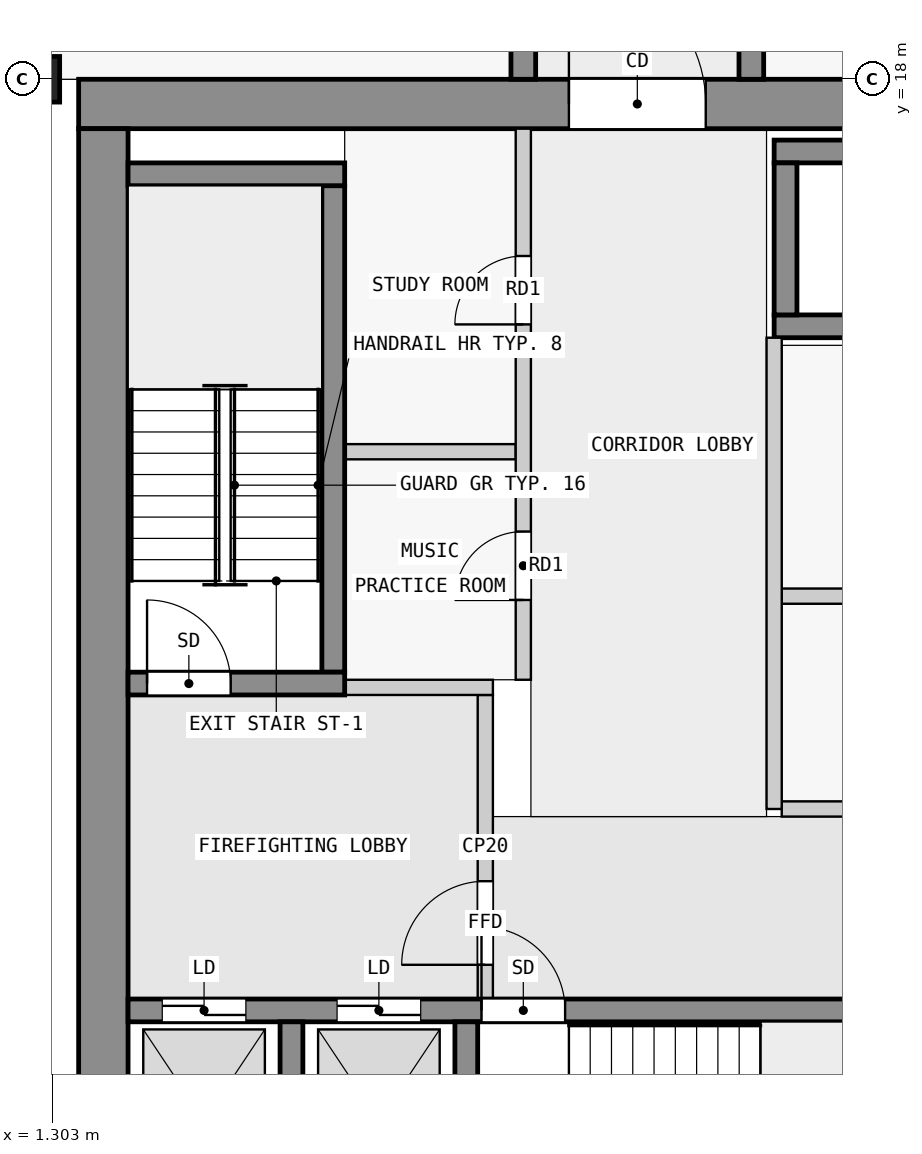
"""IFC4 building model, lengths in metres.
Left out: names, types, materials, properties, quantities, classifications, styles, units other than length and angle.
Written with IfcOpenShell. Run it as: python <this file> out.ifc"""

import sys

from ifc_helpers import new_model, si_unit, direction, frame, frame_2d, origin, origin_2d, place, context, subcontext, project, spatial, rectangle, extrude, element, fill, save


model = new_model("IFC4")
c1 = context("Model", 3, precision=1e-05, world=origin(), true_north=direction((0.0, 1.0)))
c2 = subcontext(c1, "Body", "Model", "MODEL_VIEW")
j1 = project(units=[si_unit("LENGTHUNIT", "METRE"), si_unit("PLANEANGLEUNIT", "RADIAN")], contexts=[c1])
p1 = place(None, origin())
s1 = spatial("IfcSite", under=j1, at=p1, CompositionType="ELEMENT")
p2 = place(p1, origin())
s2 = spatial("IfcBuilding", under=s1, at=p2, CompositionType="ELEMENT")
p3 = place(p2, frame((0.0, 0.0, 99.3)))
s3 = spatial("IfcBuildingStorey", under=s2, at=p3, CompositionType="ELEMENT", Elevation=99.3)
p4 = place(p3, frame((0.7, 18.0, 0.0), z_axis=(0.0, 0.0, 1.0), x_axis=(0.0, 1.0, 0.0)))
e1 = element("IfcColumn", 1, at=p4, inside=s3, PredefinedType="COLUMN", context=c2, shape_type="SweptSolid", body=[
    extrude(rectangle(XDim=0.6, YDim=1.4, at=origin_2d()), origin(), (0.0, 0.0, 1.0), 3.5),
])
p5 = place(p3, frame((1.65, 17.675, 0.0), z_axis=(0.0, 0.0, 1.0), x_axis=(1.0, 0.0, 0.0)))
e2 = element("IfcWall", 2, at=p5, inside=s3, PredefinedType="SHEAR", context=c2, shape_type="SweptSolid", body=[
    extrude(rectangle(XDim=20.85, YDim=0.65, at=frame_2d((10.425, 0.0))), origin(), (0.0, 0.0, 1.0), 3.25),
])
p6 = place(p5, frame((6.45, 0.0, 0.0)))
e3 = element("IfcOpeningElement", 3, at=p6, cuts=e2, PredefinedType="OPENING", context=c2, shape_type="SweptSolid", body=[
    extrude(rectangle(XDim=1.8, YDim=2.1, at=frame_2d((0.9, 1.05))), frame((0.0, 0.335, 0.0), z_axis=(0.0, -1.0, 0.0), x_axis=(1.0, 0.0, 0.0)), (0.0, 0.0, 1.0), 0.67),
])
p7 = place(p3, frame((1.975, 2.5, 0.0), z_axis=(0.0, 0.0, 1.0), x_axis=(0.0, 1.0, 0.0)))
e4 = element("IfcWall", 4, at=p7, inside=s3, PredefinedType="SHEAR", context=c2, shape_type="SweptSolid", body=[
    extrude(rectangle(XDim=14.85, YDim=0.65, at=frame_2d((7.425, 0.0))), origin(), (0.0, 0.0, 1.0), 3.25),
])
for number, where, z_axis, x_axis in (
    (5, (4.45, 2.8, 0.0), (0.0, 0.0, 1.0), (0.0, 1.0, 0.0)),
    (6, (6.75, 2.8, 0.0), (0.0, 0.0, 1.0), (0.0, 1.0, 0.0)),
):
    element("IfcWall", number, at=place(p3, frame(where, z_axis=z_axis, x_axis=x_axis)), inside=s3, PredefinedType="SHEAR", context=c2, shape_type="SweptSolid", body=[
        extrude(rectangle(XDim=2.8, YDim=0.3, at=frame_2d((1.4, 0.0))), origin(), (0.0, 0.0, 1.0), 3.25),
    ])
p8 = place(p3, frame((2.3, 5.75, 0.0), z_axis=(0.0, 0.0, 1.0), x_axis=(1.0, 0.0, 0.0)))
e7 = element("IfcWall", 7, at=p8, inside=s3, PredefinedType="SHEAR", context=c2, shape_type="SweptSolid", body=[
    extrude(rectangle(XDim=18.8, YDim=0.3, at=frame_2d((9.4, 0.0))), origin(), (0.0, 0.0, 1.0), 3.25),
])
p9 = place(p8, frame((4.65, 0.0, 0.0)))
e8 = element("IfcOpeningElement", 8, at=p9, cuts=e7, PredefinedType="OPENING", context=c2, shape_type="SweptSolid", body=[
    extrude(rectangle(XDim=1.1, YDim=2.1, at=frame_2d((0.55, 1.05))), frame((0.0, 0.16, 0.0), z_axis=(0.0, -1.0, 0.0), x_axis=(1.0, 0.0, 0.0)), (0.0, 0.0, 1.0), 0.32),
])
p10 = place(p8, frame((0.45, 0.0, 0.0)))
e9 = element("IfcOpeningElement", 9, at=p10, cuts=e7, PredefinedType="OPENING", context=c2, shape_type="SweptSolid", body=[
    extrude(rectangle(XDim=1.1, YDim=2.1, at=frame_2d((0.55, 1.05))), frame((0.0, 0.16, 0.0), z_axis=(0.0, -1.0, 0.0), x_axis=(1.0, 0.0, 0.0)), (0.0, 0.0, 1.0), 0.32),
])
p11 = place(p8, frame((2.75, 0.0, 0.0)))
e10 = element("IfcOpeningElement", 10, at=p11, cuts=e7, PredefinedType="OPENING", context=c2, shape_type="SweptSolid", body=[
    extrude(rectangle(XDim=1.1, YDim=2.1, at=frame_2d((0.55, 1.05))), frame((0.0, 0.16, 0.0), z_axis=(0.0, -1.0, 0.0), x_axis=(1.0, 0.0, 0.0)), (0.0, 0.0, 1.0), 0.32),
])
p12 = place(p8, frame((11.85, 0.0, 0.0)))
e11 = element("IfcOpeningElement", 11, at=p12, cuts=e7, PredefinedType="OPENING", context=c2, shape_type="SweptSolid", body=[
    extrude(rectangle(XDim=1.1, YDim=2.1, at=frame_2d((0.55, 1.05))), frame((0.0, 0.16, 0.0), z_axis=(0.0, -1.0, 0.0), x_axis=(1.0, 0.0, 0.0)), (0.0, 0.0, 1.0), 0.32),
])
p13 = place(p8, frame((14.35, 0.0, 0.0)))
e12 = element("IfcOpeningElement", 12, at=p13, cuts=e7, PredefinedType="OPENING", context=c2, shape_type="SweptSolid", body=[
    extrude(rectangle(XDim=1.1, YDim=2.1, at=frame_2d((0.55, 1.05))), frame((0.0, 0.16, 0.0), z_axis=(0.0, -1.0, 0.0), x_axis=(1.0, 0.0, 0.0)), (0.0, 0.0, 1.0), 0.32),
])
p14 = place(p8, frame((16.85, 0.0, 0.0)))
e13 = element("IfcOpeningElement", 13, at=p14, cuts=e7, PredefinedType="OPENING", context=c2, shape_type="SweptSolid", body=[
    extrude(rectangle(XDim=1.1, YDim=2.1, at=frame_2d((0.55, 1.05))), frame((0.0, 0.16, 0.0), z_axis=(0.0, -1.0, 0.0), x_axis=(1.0, 0.0, 0.0)), (0.0, 0.0, 1.0), 0.32),
])
p15 = place(p3, frame((2.3, 10.05, 0.0), z_axis=(0.0, 0.0, 1.0), x_axis=(1.0, 0.0, 0.0)))
e14 = element("IfcWall", 14, at=p15, inside=s3, PredefinedType="SHEAR", context=c2, shape_type="SweptSolid", body=[
    extrude(rectangle(XDim=2.85, YDim=0.3, at=frame_2d((1.425, 0.0))), origin(), (0.0, 0.0, 1.0), 3.25),
])
p16 = place(p15, frame((0.25, 0.0, 0.0)))
e15 = element("IfcOpeningElement", 15, at=p16, cuts=e14, PredefinedType="OPENING", context=c2, shape_type="SweptSolid", body=[
    extrude(rectangle(XDim=1.1, YDim=2.1, at=frame_2d((0.55, 1.05))), frame((0.0, 0.16, 0.0), z_axis=(0.0, -1.0, 0.0), x_axis=(1.0, 0.0, 0.0)), (0.0, 0.0, 1.0), 0.32),
])
p17 = place(p3, frame((5.0, 10.2, 0.0), z_axis=(0.0, 0.0, 1.0), x_axis=(0.0, 1.0, 0.0)))
e16 = element("IfcWall", 16, at=p17, inside=s3, PredefinedType="SHEAR", context=c2, shape_type="SweptSolid", body=[
    extrude(rectangle(XDim=6.4, YDim=0.3, at=frame_2d((3.2, 0.0))), origin(), (0.0, 0.0, 1.0), 3.25),
])
p18 = place(p3, frame((2.3, 16.75, 0.0), z_axis=(0.0, 0.0, 1.0), x_axis=(1.0, 0.0, 0.0)))
e17 = element("IfcWall", 17, at=p18, inside=s3, PredefinedType="SHEAR", context=c2, shape_type="SweptSolid", body=[
    extrude(rectangle(XDim=2.85, YDim=0.3, at=frame_2d((1.425, 0.0))), origin(), (0.0, 0.0, 1.0), 3.25),
])
for number, where, z_axis, x_axis in (
    (18, (10.8, 17.05, 0.0), (0.0, 0.0, 1.0), (1.0, 0.0, 0.0)),
    (19, (10.8, 14.75, 0.0), (0.0, 0.0, 1.0), (1.0, 0.0, 0.0)),
):
    element("IfcWall", number, at=place(p3, frame(where, z_axis=z_axis, x_axis=x_axis)), inside=s3, PredefinedType="SHEAR", context=c2, shape_type="SweptSolid", body=[
        extrude(rectangle(XDim=7.8, YDim=0.3, at=frame_2d((3.9, 0.0))), origin(), (0.0, 0.0, 1.0), 3.25),
    ])
p19 = place(p3, frame((10.95, 14.9, 0.0), z_axis=(0.0, 0.0, 1.0), x_axis=(0.0, 1.0, 0.0)))
e20 = element("IfcWall", 20, at=p19, inside=s3, PredefinedType="SHEAR", context=c2, shape_type="SweptSolid", body=[
    extrude(rectangle(XDim=2.0, YDim=0.3, at=frame_2d((1.0, 0.0))), origin(), (0.0, 0.0, 1.0), 3.25),
])
p20 = place(p3, frame((7.5, 18.0, 0.0), z_axis=(0.0, 0.0, 1.0), x_axis=(0.0, 1.0, 0.0)))
e21 = element("IfcWall", 21, at=p20, inside=s3, PredefinedType="SHEAR", context=c2, shape_type="SweptSolid", body=[
    extrude(rectangle(XDim=27.0, YDim=0.325, at=frame_2d((13.5, 0.0))), origin(), (0.0, 0.0, 1.0), 3.25),
])
p21 = place(p20, frame((1.75, 0.0, 0.0)))
e22 = element("IfcOpeningElement", 22, at=p21, cuts=e21, PredefinedType="OPENING", context=c2, shape_type="SweptSolid", body=[
    extrude(rectangle(XDim=1.0, YDim=2.1, at=frame_2d((0.5, 1.05))), frame((0.0, 0.172, 0.0), z_axis=(0.0, -1.0, 0.0), x_axis=(1.0, 0.0, 0.0)), (0.0, 0.0, 1.0), 0.345),
])
p22 = place(p20, frame((6.25, 0.0, 0.0)))
e23 = element("IfcOpeningElement", 23, at=p22, cuts=e21, PredefinedType="OPENING", context=c2, shape_type="SweptSolid", body=[
    extrude(rectangle(XDim=1.0, YDim=2.1, at=frame_2d((0.5, 1.05))), frame((0.0, 0.172, 0.0), z_axis=(0.0, -1.0, 0.0), x_axis=(1.0, 0.0, 0.0)), (0.0, 0.0, 1.0), 0.345),
])
p23 = place(p20, frame((10.75, 0.0, 0.0)))
e24 = element("IfcOpeningElement", 24, at=p23, cuts=e21, PredefinedType="OPENING", context=c2, shape_type="SweptSolid", body=[
    extrude(rectangle(XDim=1.0, YDim=2.1, at=frame_2d((0.5, 1.05))), frame((0.0, 0.172, 0.0), z_axis=(0.0, -1.0, 0.0), x_axis=(1.0, 0.0, 0.0)), (0.0, 0.0, 1.0), 0.345),
])
p24 = place(p20, frame((15.25, 0.0, 0.0)))
e25 = element("IfcOpeningElement", 25, at=p24, cuts=e21, PredefinedType="OPENING", context=c2, shape_type="SweptSolid", body=[
    extrude(rectangle(XDim=1.0, YDim=2.1, at=frame_2d((0.5, 1.05))), frame((0.0, 0.172, 0.0), z_axis=(0.0, -1.0, 0.0), x_axis=(1.0, 0.0, 0.0)), (0.0, 0.0, 1.0), 0.345),
])
p25 = place(p20, frame((19.75, 0.0, 0.0)))
e26 = element("IfcOpeningElement", 26, at=p25, cuts=e21, PredefinedType="OPENING", context=c2, shape_type="SweptSolid", body=[
    extrude(rectangle(XDim=1.0, YDim=2.1, at=frame_2d((0.5, 1.05))), frame((0.0, 0.172, 0.0), z_axis=(0.0, -1.0, 0.0), x_axis=(1.0, 0.0, 0.0)), (0.0, 0.0, 1.0), 0.345),
])
p26 = place(p20, frame((23.25, 0.0, 0.0)))
e27 = element("IfcOpeningElement", 27, at=p26, cuts=e21, PredefinedType="OPENING", context=c2, shape_type="SweptSolid", body=[
    extrude(rectangle(XDim=0.9, YDim=2.1, at=frame_2d((0.45, 1.05))), frame((0.0, 0.172, 0.0), z_axis=(0.0, -1.0, 0.0), x_axis=(1.0, 0.0, 0.0)), (0.0, 0.0, 1.0), 0.345),
])
p27 = place(p20, frame((25.45, 0.0, 0.0)))
e28 = element("IfcOpeningElement", 28, at=p27, cuts=e21, PredefinedType="OPENING", context=c2, shape_type="SweptSolid", body=[
    extrude(rectangle(XDim=1.0, YDim=2.1, at=frame_2d((0.5, 1.05))), frame((0.0, 0.172, 0.0), z_axis=(0.0, -1.0, 0.0), x_axis=(1.0, 0.0, 0.0)), (0.0, 0.0, 1.0), 0.345),
])
p28 = place(p3, frame((10.5, 18.0, 0.0), z_axis=(0.0, 0.0, 1.0), x_axis=(0.0, 1.0, 0.0)))
e29 = element("IfcWall", 29, at=p28, inside=s3, PredefinedType="SHEAR", context=c2, shape_type="SweptSolid", body=[
    extrude(rectangle(XDim=27.0, YDim=0.325, at=frame_2d((13.5, 0.0))), origin(), (0.0, 0.0, 1.0), 3.25),
])
p29 = place(p28, frame((1.75, 0.0, 0.0)))
e30 = element("IfcOpeningElement", 30, at=p29, cuts=e29, PredefinedType="OPENING", context=c2, shape_type="SweptSolid", body=[
    extrude(rectangle(XDim=1.0, YDim=2.1, at=frame_2d((0.5, 1.05))), frame((0.0, 0.172, 0.0), z_axis=(0.0, -1.0, 0.0), x_axis=(1.0, 0.0, 0.0)), (0.0, 0.0, 1.0), 0.345),
])
p30 = place(p28, frame((6.25, 0.0, 0.0)))
e31 = element("IfcOpeningElement", 31, at=p30, cuts=e29, PredefinedType="OPENING", context=c2, shape_type="SweptSolid", body=[
    extrude(rectangle(XDim=1.0, YDim=2.1, at=frame_2d((0.5, 1.05))), frame((0.0, 0.172, 0.0), z_axis=(0.0, -1.0, 0.0), x_axis=(1.0, 0.0, 0.0)), (0.0, 0.0, 1.0), 0.345),
])
p31 = place(p28, frame((13.05, 0.0, 0.0)))
e32 = element("IfcOpeningElement", 32, at=p31, cuts=e29, PredefinedType="OPENING", context=c2, shape_type="SweptSolid", body=[
    extrude(rectangle(XDim=1.0, YDim=2.1, at=frame_2d((0.5, 1.05))), frame((0.0, 0.172, 0.0), z_axis=(0.0, -1.0, 0.0), x_axis=(1.0, 0.0, 0.0)), (0.0, 0.0, 1.0), 0.345),
])
p32 = place(p28, frame((21.35, 0.0, 0.0)))
e33 = element("IfcOpeningElement", 33, at=p32, cuts=e29, PredefinedType="OPENING", context=c2, shape_type="SweptSolid", body=[
    extrude(rectangle(XDim=1.0, YDim=2.1, at=frame_2d((0.5, 1.05))), frame((0.0, 0.172, 0.0), z_axis=(0.0, -1.0, 0.0), x_axis=(1.0, 0.0, 0.0)), (0.0, 0.0, 1.0), 0.345),
])
p33 = place(p3, frame((7.0, 5.9, 0.0), z_axis=(0.0, 0.0, 1.0), x_axis=(0.0, 1.0, 0.0)))
e34 = element("IfcWall", 34, at=p33, inside=s3, PredefinedType="PARTITIONING", context=c2, shape_type="SweptSolid", body=[
    extrude(rectangle(XDim=4.0, YDim=0.2, at=frame_2d((2.0, 0.0))), origin(), (0.0, 0.0, 1.0), 3.25),
])
p34 = place(p33, frame((0.45, 0.0, 0.0)))
e35 = element("IfcOpeningElement", 35, at=p34, cuts=e34, PredefinedType="OPENING", context=c2, shape_type="SweptSolid", body=[
    extrude(rectangle(XDim=1.1, YDim=2.1, at=frame_2d((0.55, 1.05))), frame((0.0, 0.11, 0.0), z_axis=(0.0, -1.0, 0.0), x_axis=(1.0, 0.0, 0.0)), (0.0, 0.0, 1.0), 0.22),
])
p35 = place(p3, frame((5.15, 10.0, 0.0), z_axis=(0.0, 0.0, 1.0), x_axis=(1.0, 0.0, 0.0)))
e36 = element("IfcWall", 36, at=p35, inside=s3, PredefinedType="PARTITIONING", context=c2, shape_type="SweptSolid", body=[
    extrude(rectangle(XDim=1.95, YDim=0.2, at=frame_2d((0.975, 0.0))), origin(), (0.0, 0.0, 1.0), 3.25),
])
p36 = place(p3, frame((10.8, 8.4, 0.0), z_axis=(0.0, 0.0, 1.0), x_axis=(0.0, 1.0, 0.0)))
e37 = element("IfcWall", 37, at=p36, inside=s3, PredefinedType="PARTITIONING", context=c2, shape_type="SweptSolid", body=[
    extrude(rectangle(XDim=6.2, YDim=0.2, at=frame_2d((3.1, 0.0))), origin(), (0.0, 0.0, 1.0), 3.25),
])
for number, where, z_axis, x_axis in (
    (38, (10.9, 8.4, 0.0), (0.0, 0.0, 1.0), (1.0, 0.0, 0.0)),
    (39, (10.9, 11.2, 0.0), (0.0, 0.0, 1.0), (1.0, 0.0, 0.0)),
):
    element("IfcWall", number, at=place(p3, frame(where, z_axis=z_axis, x_axis=x_axis)), inside=s3, PredefinedType="PARTITIONING", context=c2, shape_type="SweptSolid", body=[
        extrude(rectangle(XDim=7.4, YDim=0.2, at=frame_2d((3.7, 0.0))), origin(), (0.0, 0.0, 1.0), 3.25),
    ])
p37 = place(p3, frame((7.5, 10.1, 0.0), z_axis=(0.0, 0.0, 1.0), x_axis=(0.0, 1.0, 0.0)))
e40 = element("IfcWall", 40, at=p37, inside=s3, PredefinedType="PARTITIONING", context=c2, shape_type="SweptSolid", body=[
    extrude(rectangle(XDim=7.25, YDim=0.2, at=frame_2d((3.625, 0.0))), origin(), (0.0, 0.0, 1.0), 3.25),
])
p38 = place(p37, frame((1.05, 0.0, 0.0)))
e41 = element("IfcOpeningElement", 41, at=p38, cuts=e40, PredefinedType="OPENING", context=c2, shape_type="SweptSolid", body=[
    extrude(rectangle(XDim=0.9, YDim=2.1, at=frame_2d((0.45, 1.05))), frame((0.0, 0.11, 0.0), z_axis=(0.0, -1.0, 0.0), x_axis=(1.0, 0.0, 0.0)), (0.0, 0.0, 1.0), 0.22),
])
p39 = place(p37, frame((4.675, 0.0, 0.0)))
e42 = element("IfcOpeningElement", 42, at=p39, cuts=e40, PredefinedType="OPENING", context=c2, shape_type="SweptSolid", body=[
    extrude(rectangle(XDim=0.9, YDim=2.1, at=frame_2d((0.45, 1.05))), frame((0.0, 0.11, 0.0), z_axis=(0.0, -1.0, 0.0), x_axis=(1.0, 0.0, 0.0)), (0.0, 0.0, 1.0), 0.22),
])
p40 = place(p3, frame((5.15, 13.1, 0.0), z_axis=(0.0, 0.0, 1.0), x_axis=(1.0, 0.0, 0.0)))
e43 = element("IfcWall", 43, at=p40, inside=s3, PredefinedType="PARTITIONING", context=c2, shape_type="SweptSolid", body=[
    extrude(rectangle(XDim=2.25, YDim=0.2, at=frame_2d((1.125, 0.0))), origin(), (0.0, 0.0, 1.0), 3.25),
])
p41 = place(p34, origin())
e44 = element("IfcDoor", 44, at=p41, inside=s3, OperationType="SINGLE_SWING_LEFT", PredefinedType="DOOR", context=c2, shape_type="SweptSolid", body=[
    extrude(rectangle(XDim=1.1, YDim=2.1, at=frame_2d((0.55, 1.05))), frame((0.0, 0.025, 0.0), z_axis=(0.0, -1.0, 0.0), x_axis=(1.0, 0.0, 0.0)), (0.0, 0.0, 1.0), 0.05),
])
fill(e35, e44)
p42 = place(p16, origin())
e45 = element("IfcDoor", 45, at=p42, inside=s3, OperationType="SINGLE_SWING_RIGHT", PredefinedType="DOOR", context=c2, shape_type="SweptSolid", body=[
    extrude(rectangle(XDim=1.1, YDim=2.1, at=frame_2d((0.55, 1.05))), frame((0.0, 0.025, 0.0), z_axis=(0.0, -1.0, 0.0), x_axis=(1.0, 0.0, 0.0)), (0.0, 0.0, 1.0), 0.05),
])
fill(e15, e45)
p43 = place(p9, origin())
e46 = element("IfcDoor", 46, at=p43, inside=s3, OperationType="SINGLE_SWING_LEFT", PredefinedType="DOOR", context=c2, shape_type="SweptSolid", body=[
    extrude(rectangle(XDim=1.1, YDim=2.1, at=frame_2d((0.55, 1.05))), frame((0.0, 0.025, 0.0), z_axis=(0.0, -1.0, 0.0), x_axis=(1.0, 0.0, 0.0)), (0.0, 0.0, 1.0), 0.05),
])
fill(e8, e46)
p44 = place(p10, origin())
e47 = element("IfcDoor", 47, at=p44, inside=s3, OperationType="DOUBLE_DOOR_SLIDING", PredefinedType="DOOR", context=c2, shape_type="SweptSolid", body=[
    extrude(rectangle(XDim=1.1, YDim=2.1, at=frame_2d((0.55, 1.05))), frame((0.0, 0.025, 0.0), z_axis=(0.0, -1.0, 0.0), x_axis=(1.0, 0.0, 0.0)), (0.0, 0.0, 1.0), 0.05),
])
fill(e9, e47)
p45 = place(p11, origin())
e48 = element("IfcDoor", 48, at=p45, inside=s3, OperationType="DOUBLE_DOOR_SLIDING", PredefinedType="DOOR", context=c2, shape_type="SweptSolid", body=[
    extrude(rectangle(XDim=1.1, YDim=2.1, at=frame_2d((0.55, 1.05))), frame((0.0, 0.025, 0.0), z_axis=(0.0, -1.0, 0.0), x_axis=(1.0, 0.0, 0.0)), (0.0, 0.0, 1.0), 0.05),
])
fill(e10, e48)
p46 = place(p6, origin())
e49 = element("IfcDoor", 49, at=p46, inside=s3, OperationType="DOUBLE_DOOR_SINGLE_SWING", PredefinedType="DOOR", context=c2, shape_type="SweptSolid", body=[
    extrude(rectangle(XDim=1.8, YDim=2.1, at=frame_2d((0.9, 1.05))), frame((0.0, 0.025, 0.0), z_axis=(0.0, -1.0, 0.0), x_axis=(1.0, 0.0, 0.0)), (0.0, 0.0, 1.0), 0.05),
])
fill(e3, e49)
p47 = place(p38, origin())
e50 = element("IfcDoor", 50, at=p47, inside=s3, OperationType="SINGLE_SWING_RIGHT", PredefinedType="DOOR", context=c2, shape_type="SweptSolid", body=[
    extrude(rectangle(XDim=0.9, YDim=2.1, at=frame_2d((0.45, 1.05))), frame((0.0, 0.025, 0.0), z_axis=(0.0, -1.0, 0.0), x_axis=(1.0, 0.0, 0.0)), (0.0, 0.0, 1.0), 0.05),
])
fill(e41, e50)
p48 = place(p39, origin())
e51 = element("IfcDoor", 51, at=p48, inside=s3, OperationType="SINGLE_SWING_RIGHT", PredefinedType="DOOR", context=c2, shape_type="SweptSolid", body=[
    extrude(rectangle(XDim=0.9, YDim=2.1, at=frame_2d((0.45, 1.05))), frame((0.0, 0.025, 0.0), z_axis=(0.0, -1.0, 0.0), x_axis=(1.0, 0.0, 0.0)), (0.0, 0.0, 1.0), 0.05),
])
fill(e42, e51)
save(model, sys.argv[1])
